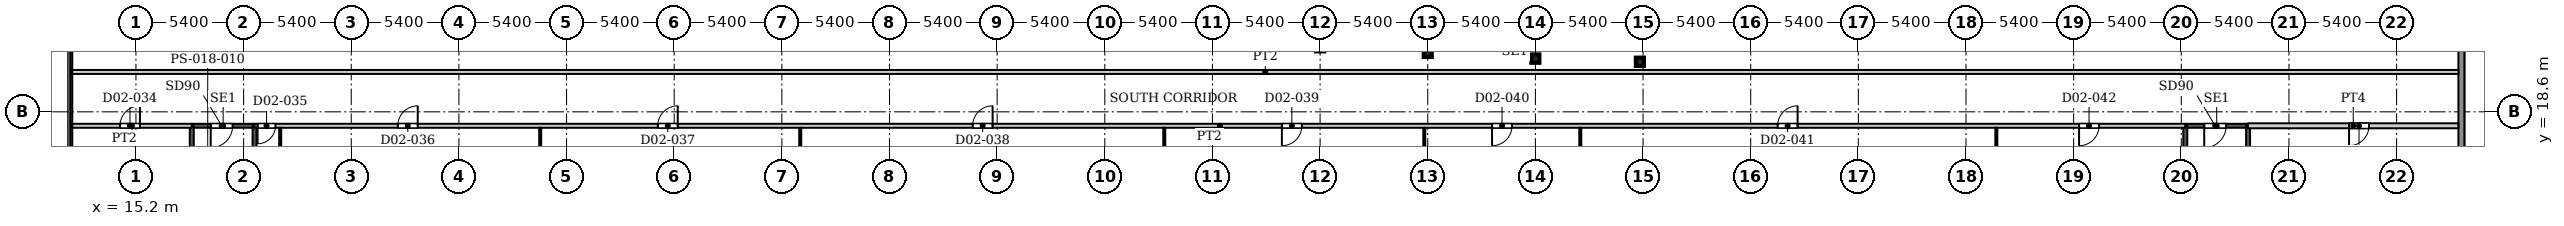
"""IFC4 building model, lengths in metres.
Left out: names, types, materials, properties, quantities, classifications, styles, units other than length and angle.
Written with IfcOpenShell. Run it as: python <this file> out.ifc"""

import sys

from ifc_helpers import new_model, si_unit, direction, frame, frame_2d, origin, origin_2d, place, context, subcontext, project, spatial, rectangle, i_section, extrude, source, transform, mapped, element, fill, save


model = new_model("IFC4")
c1 = context("Model", 3, precision=1e-05, world=origin(), true_north=direction((0.0, 1.0)))
c2 = subcontext(c1, "Body", "Model", "MODEL_VIEW")
j1 = project(units=[si_unit("LENGTHUNIT", "METRE"), si_unit("PLANEANGLEUNIT", "RADIAN")], contexts=[c1])
p1 = place(None, origin())
s1 = spatial("IfcSite", under=j1, at=p1, CompositionType="ELEMENT")
p2 = place(p1, origin())
s2 = spatial("IfcBuilding", under=s1, at=p2, CompositionType="ELEMENT")
p3 = place(p2, frame((0.0, 0.0, 12.5)))
s3 = spatial("IfcBuildingStorey", under=s2, at=p3, CompositionType="ELEMENT", Elevation=12.5)
for number, where, z_axis, x_axis in (
    (1, (90.64, 21.11, 0.0), (0.0, 0.0, 1.0), (1.0, 0.0, 0.0)),
    (2, (85.4, 21.27, 0.0), (0.0, 0.0, 1.0), (1.0, 0.0, 0.0)),
    (3, (80.0, 21.56, 0.0), (0.0, 0.0, 1.0), (1.0, 0.0, 0.0)),
):
    element("IfcColumn", number, at=place(p3, frame(where, z_axis=z_axis, x_axis=x_axis)), inside=s3, PredefinedType="COLUMN", context=c2, shape_type="SweptSolid", body=[
        extrude(i_section(OverallWidth=0.409, OverallDepth=0.425, WebThickness=0.033, FlangeThickness=0.052, FilletRadius=0.013, at=origin_2d()), origin(), (0.0, 0.0, 1.0), 4.5),
    ])
p4 = place(p3, frame((131.85, 54.72, 0.0), z_axis=(0.0, 0.0, 1.0), x_axis=(0.0, -1.0, 0.0)))
e4 = element("IfcWall", 4, at=p4, inside=s3, PredefinedType="SOLIDWALL", context=c2, shape_type="SweptSolid", body=[
    extrude(rectangle(XDim=38.72, YDim=0.3, at=frame_2d((19.36, 0.0))), origin(), (0.0, 0.0, 1.0), 4.25),
])
p5 = place(p4, frame((2.435, 0.0, 0.9)))
e5 = element("IfcOpeningElement", 5, at=p5, cuts=e4, PredefinedType="OPENING", context=c2, shape_type="SweptSolid", body=[
    extrude(rectangle(XDim=2.7, YDim=2.1, at=frame_2d((1.35, 1.05))), frame((0.0, 0.16, 0.0), z_axis=(0.0, -1.0, 0.0), x_axis=(1.0, 0.0, 0.0)), (0.0, 0.0, 1.0), 0.32),
])
p6 = place(p4, frame((13.58, 0.0, 0.9)))
e6 = element("IfcOpeningElement", 6, at=p6, cuts=e4, PredefinedType="OPENING", context=c2, shape_type="SweptSolid", body=[
    extrude(rectangle(XDim=2.7, YDim=2.1, at=frame_2d((1.35, 1.05))), frame((0.0, 0.16, 0.0), z_axis=(0.0, -1.0, 0.0), x_axis=(1.0, 0.0, 0.0)), (0.0, 0.0, 1.0), 0.32),
])
p7 = place(p4, frame((26.16, 0.0, 0.9)))
e7 = element("IfcOpeningElement", 7, at=p7, cuts=e4, PredefinedType="OPENING", context=c2, shape_type="SweptSolid", body=[
    extrude(rectangle(XDim=2.7, YDim=2.1, at=frame_2d((1.35, 1.05))), frame((0.0, 0.16, 0.0), z_axis=(0.0, -1.0, 0.0), x_axis=(1.0, 0.0, 0.0)), (0.0, 0.0, 1.0), 0.32),
])
p8 = place(p3, frame((18.0, 17.9, 0.0), z_axis=(0.0, 0.0, 1.0), x_axis=(1.0, 0.0, 0.0)))
e8 = element("IfcWall", 8, at=p8, inside=s3, PredefinedType="SHEAR", context=c2, shape_type="SweptSolid", body=[
    extrude(rectangle(XDim=3.15, YDim=0.2, at=frame_2d((1.575, 0.0))), origin(), (0.0, 0.0, 1.0), 4.5),
])
p9 = place(p8, frame((0.95, 0.0, 0.0)))
e9 = element("IfcOpeningElement", 9, at=p9, cuts=e8, PredefinedType="OPENING", context=c2, shape_type="SweptSolid", body=[
    extrude(rectangle(XDim=1.1, YDim=2.2, at=frame_2d((0.55, 1.1))), frame((0.0, 0.11, 0.0), z_axis=(0.0, -1.0, 0.0), x_axis=(1.0, 0.0, 0.0)), (0.0, 0.0, 1.0), 0.22),
])
p10 = place(p3, frame((18.0, 11.2, 0.0), z_axis=(0.0, 0.0, 1.0), x_axis=(0.0, 1.0, 0.0)))
e10 = element("IfcWall", 10, at=p10, inside=s3, PredefinedType="SHEAR", context=c2, shape_type="SweptSolid", body=[
    extrude(rectangle(XDim=6.7, YDim=0.2, at=frame_2d((3.35, 0.0))), origin(), (0.0, 0.0, 1.0), 4.5),
])
p11 = place(p3, frame((21.15, 10.0, 0.0), z_axis=(0.0, 0.0, 1.0), x_axis=(0.0, 1.0, 0.0)))
e11 = element("IfcWall", 11, at=p11, inside=s3, PredefinedType="SHEAR", context=c2, shape_type="SweptSolid", body=[
    extrude(rectangle(XDim=7.9, YDim=0.2, at=frame_2d((3.95, 0.0))), origin(), (0.0, 0.0, 1.0), 4.5),
])
p12 = place(p3, frame((118.0, 17.9, 0.0), z_axis=(0.0, 0.0, 1.0), x_axis=(1.0, 0.0, 0.0)))
e12 = element("IfcWall", 12, at=p12, inside=s3, PredefinedType="SHEAR", context=c2, shape_type="SweptSolid", body=[
    extrude(rectangle(XDim=3.15, YDim=0.2, at=frame_2d((1.575, 0.0))), origin(), (0.0, 0.0, 1.0), 4.5),
])
p13 = place(p12, frame((0.95, 0.0, 0.0)))
e13 = element("IfcOpeningElement", 13, at=p13, cuts=e12, PredefinedType="OPENING", context=c2, shape_type="SweptSolid", body=[
    extrude(rectangle(XDim=1.1, YDim=2.2, at=frame_2d((0.55, 1.1))), frame((0.0, 0.11, 0.0), z_axis=(0.0, -1.0, 0.0), x_axis=(1.0, 0.0, 0.0)), (0.0, 0.0, 1.0), 0.22),
])
p14 = place(p3, frame((118.0, 11.2, 0.0), z_axis=(0.0, 0.0, 1.0), x_axis=(0.0, 1.0, 0.0)))
e14 = element("IfcWall", 14, at=p14, inside=s3, PredefinedType="SHEAR", context=c2, shape_type="SweptSolid", body=[
    extrude(rectangle(XDim=6.7, YDim=0.2, at=frame_2d((3.35, 0.0))), origin(), (0.0, 0.0, 1.0), 4.5),
])
p15 = place(p3, frame((121.15, 10.0, 0.0), z_axis=(0.0, 0.0, 1.0), x_axis=(0.0, 1.0, 0.0)))
e15 = element("IfcWall", 15, at=p15, inside=s3, PredefinedType="SHEAR", context=c2, shape_type="SweptSolid", body=[
    extrude(rectangle(XDim=7.9, YDim=0.2, at=frame_2d((3.95, 0.0))), origin(), (0.0, 0.0, 1.0), 4.5),
])
p16 = place(p3, frame((12.0, 17.9, 0.0), z_axis=(0.0, 0.0, 1.0), x_axis=(1.0, 0.0, 0.0)))
e16 = element("IfcWall", 16, at=p16, inside=s3, PredefinedType="PARTITIONING", context=c2, shape_type="SweptSolid", body=[
    extrude(rectangle(XDim=6.0, YDim=0.2, at=frame_2d((3.0, 0.0))), origin(), (0.0, 0.0, 1.0), 4.18),
])
p17 = place(p16, frame((2.4, 0.0, 0.0)))
e17 = element("IfcOpeningElement", 17, at=p17, cuts=e16, PredefinedType="OPENING", context=c2, shape_type="SweptSolid", body=[
    extrude(rectangle(XDim=1.0, YDim=2.1, at=frame_2d((0.5, 1.05))), frame((0.0, 0.11, 0.0), z_axis=(0.0, -1.0, 0.0), x_axis=(1.0, 0.0, 0.0)), (0.0, 0.0, 1.0), 0.22),
])
p18 = place(p3, frame((12.0, 20.6, 0.0), z_axis=(0.0, 0.0, 1.0), x_axis=(1.0, 0.0, 0.0)))
e18 = element("IfcWall", 18, at=p18, inside=s3, PredefinedType="PARTITIONING", context=c2, shape_type="SweptSolid", body=[
    extrude(rectangle(XDim=119.701, YDim=0.2, at=frame_2d((59.851, 0.0))), origin(), (0.0, 0.0, 1.0), 4.18),
])
p19 = place(p3, frame((21.15, 17.9, 0.0), z_axis=(0.0, 0.0, 1.0), x_axis=(1.0, 0.0, 0.0)))
e19 = element("IfcWall", 19, at=p19, inside=s3, PredefinedType="PARTITIONING", context=c2, shape_type="SweptSolid", body=[
    extrude(rectangle(XDim=96.85, YDim=0.2, at=frame_2d((48.425, 0.0))), origin(), (0.0, 0.0, 1.0), 4.18),
])
p20 = place(p19, frame((0.15, 0.0, 0.0)))
e20 = element("IfcOpeningElement", 20, at=p20, cuts=e19, PredefinedType="OPENING", context=c2, shape_type="SweptSolid", body=[
    extrude(rectangle(XDim=0.9, YDim=2.1, at=frame_2d((0.45, 1.05))), frame((0.0, 0.11, 0.0), z_axis=(0.0, -1.0, 0.0), x_axis=(1.0, 0.0, 0.0)), (0.0, 0.0, 1.0), 0.22),
])
p21 = place(p19, frame((7.185, 0.0, 0.0)))
e21 = element("IfcOpeningElement", 21, at=p21, cuts=e19, PredefinedType="OPENING", context=c2, shape_type="SweptSolid", body=[
    extrude(rectangle(XDim=1.0, YDim=2.1, at=frame_2d((0.5, 1.05))), frame((0.0, 0.11, 0.0), z_axis=(0.0, -1.0, 0.0), x_axis=(1.0, 0.0, 0.0)), (0.0, 0.0, 1.0), 0.22),
])
p22 = place(p19, frame((20.228, 0.0, 0.0)))
e22 = element("IfcOpeningElement", 22, at=p22, cuts=e19, PredefinedType="OPENING", context=c2, shape_type="SweptSolid", body=[
    extrude(rectangle(XDim=1.0, YDim=2.1, at=frame_2d((0.5, 1.05))), frame((0.0, 0.11, 0.0), z_axis=(0.0, -1.0, 0.0), x_axis=(1.0, 0.0, 0.0)), (0.0, 0.0, 1.0), 0.22),
])
p23 = place(p19, frame((36.022, 0.0, 0.0)))
e23 = element("IfcOpeningElement", 23, at=p23, cuts=e19, PredefinedType="OPENING", context=c2, shape_type="SweptSolid", body=[
    extrude(rectangle(XDim=1.0, YDim=2.1, at=frame_2d((0.5, 1.05))), frame((0.0, 0.11, 0.0), z_axis=(0.0, -1.0, 0.0), x_axis=(1.0, 0.0, 0.0)), (0.0, 0.0, 1.0), 0.22),
])
p24 = place(p19, frame((51.533, 0.0, 0.0)))
e24 = element("IfcOpeningElement", 24, at=p24, cuts=e19, PredefinedType="OPENING", context=c2, shape_type="SweptSolid", body=[
    extrude(rectangle(XDim=1.0, YDim=2.1, at=frame_2d((0.5, 1.05))), frame((0.0, 0.11, 0.0), z_axis=(0.0, -1.0, 0.0), x_axis=(1.0, 0.0, 0.0)), (0.0, 0.0, 1.0), 0.22),
])
p25 = place(p19, frame((62.076, 0.0, 0.0)))
e25 = element("IfcOpeningElement", 25, at=p25, cuts=e19, PredefinedType="OPENING", context=c2, shape_type="SweptSolid", body=[
    extrude(rectangle(XDim=1.0, YDim=2.1, at=frame_2d((0.5, 1.05))), frame((0.0, 0.11, 0.0), z_axis=(0.0, -1.0, 0.0), x_axis=(1.0, 0.0, 0.0)), (0.0, 0.0, 1.0), 0.22),
])
p26 = place(p19, frame((76.402, 0.0, 0.0)))
e26 = element("IfcOpeningElement", 26, at=p26, cuts=e19, PredefinedType="OPENING", context=c2, shape_type="SweptSolid", body=[
    extrude(rectangle(XDim=1.0, YDim=2.1, at=frame_2d((0.5, 1.05))), frame((0.0, 0.11, 0.0), z_axis=(0.0, -1.0, 0.0), x_axis=(1.0, 0.0, 0.0)), (0.0, 0.0, 1.0), 0.22),
])
p27 = place(p19, frame((91.522, 0.0, 0.0)))
e27 = element("IfcOpeningElement", 27, at=p27, cuts=e19, PredefinedType="OPENING", context=c2, shape_type="SweptSolid", body=[
    extrude(rectangle(XDim=1.0, YDim=2.1, at=frame_2d((0.5, 1.05))), frame((0.0, 0.11, 0.0), z_axis=(0.0, -1.0, 0.0), x_axis=(1.0, 0.0, 0.0)), (0.0, 0.0, 1.0), 0.22),
])
for number, where, z_axis, x_axis in (
    (28, (22.435, 10.299, 0.0), (0.0, 0.0, 1.0), (0.0, 1.0, 0.0)),
    (29, (35.478, 10.299, 0.0), (0.0, 0.0, 1.0), (0.0, 1.0, 0.0)),
    (30, (48.522, 10.299, 0.0), (0.0, 0.0, 1.0), (0.0, 1.0, 0.0)),
):
    element("IfcWall", number, at=place(p3, frame(where, z_axis=z_axis, x_axis=x_axis)), inside=s3, PredefinedType="PARTITIONING", context=c2, shape_type="SweptSolid", body=[
        extrude(rectangle(XDim=7.501, YDim=0.1, at=frame_2d((3.75, 0.0))), origin(), (0.0, 0.0, 1.0), 4.18),
    ])
p28 = place(p3, frame((66.783, 10.0, 0.0), z_axis=(0.0, 0.0, 1.0), x_axis=(0.0, 1.0, 0.0)))
e31 = element("IfcWall", 31, at=p28, inside=s3, PredefinedType="PARTITIONING", context=c2, shape_type="SweptSolid", body=[
    extrude(rectangle(XDim=7.8, YDim=0.1, at=frame_2d((3.9, 0.0))), origin(), (0.0, 0.0, 1.0), 4.18),
])
p29 = place(p3, frame((79.826, 10.0, 0.0), z_axis=(0.0, 0.0, 1.0), x_axis=(0.0, 1.0, 0.0)))
e32 = element("IfcWall", 32, at=p29, inside=s3, PredefinedType="PARTITIONING", context=c2, shape_type="SweptSolid", body=[
    extrude(rectangle(XDim=7.8, YDim=0.1, at=frame_2d((3.9, 0.0))), origin(), (0.0, 0.0, 1.0), 3.763),
])
for number, where, z_axis, x_axis in (
    (33, (87.652, 10.0, 0.0), (0.0, 0.0, 1.0), (0.0, 1.0, 0.0)),
    (34, (108.522, 10.0, 0.0), (0.0, 0.0, 1.0), (0.0, 1.0, 0.0)),
):
    element("IfcWall", number, at=place(p3, frame(where, z_axis=z_axis, x_axis=x_axis)), inside=s3, PredefinedType="PARTITIONING", context=c2, shape_type="SweptSolid", body=[
        extrude(rectangle(XDim=7.8, YDim=0.1, at=frame_2d((3.9, 0.0))), origin(), (0.0, 0.0, 1.0), 4.18),
    ])
p30 = place(p3, frame((121.15, 17.9, 0.0), z_axis=(0.0, 0.0, 1.0), x_axis=(1.0, 0.0, 0.0)))
e35 = element("IfcWall", 35, at=p30, inside=s3, PredefinedType="PARTITIONING", context=c2, shape_type="SweptSolid", body=[
    extrude(rectangle(XDim=10.551, YDim=0.25, at=frame_2d((5.275, 0.0))), origin(), (0.0, 0.0, 1.0), 4.18),
])
p31 = place(p30, frame((5.065, 0.0, 0.0)))
e36 = element("IfcOpeningElement", 36, at=p31, cuts=e35, PredefinedType="OPENING", context=c2, shape_type="SweptSolid", body=[
    extrude(rectangle(XDim=1.0, YDim=2.1, at=frame_2d((0.5, 1.05))), frame((0.0, 0.135, 0.0), z_axis=(0.0, -1.0, 0.0), x_axis=(1.0, 0.0, 0.0)), (0.0, 0.0, 1.0), 0.27),
])
m1 = source(origin(), c2, "Body", "SweptSolid", [
    extrude(rectangle(XDim=1.1, YDim=2.2, at=frame_2d((0.55, 1.1))), frame((0.0, 0.025, 0.0), z_axis=(0.0, -1.0, 0.0), x_axis=(1.0, 0.0, 0.0)), (0.0, 0.0, 1.0), 0.05),
])
p32 = place(p9, origin())
e37 = element("IfcDoor", 37, at=p32, inside=s3, OperationType="SINGLE_SWING_RIGHT", PredefinedType="DOOR", context=c2, shape_type="MappedRepresentation", body=[
    mapped(m1, transform((0.0, 0.0, 0.0), x_axis=(1.0, 0.0, 0.0), y_axis=(0.0, 1.0, 0.0), z_axis=(0.0, 0.0, 1.0), scale=1.0)),
])
fill(e9, e37)
p33 = place(p13, origin())
e38 = element("IfcDoor", 38, at=p33, inside=s3, OperationType="SINGLE_SWING_RIGHT", PredefinedType="DOOR", context=c2, shape_type="MappedRepresentation", body=[
    mapped(m1, transform((0.0, 0.0, 0.0), x_axis=(1.0, 0.0, 0.0), y_axis=(0.0, 1.0, 0.0), z_axis=(0.0, 0.0, 1.0), scale=1.0)),
])
fill(e13, e38)
m2 = source(origin(), c2, "Body", "SweptSolid", [
    extrude(rectangle(XDim=1.0, YDim=2.1, at=frame_2d((0.5, 1.05))), frame((0.0, 0.025, 0.0), z_axis=(0.0, -1.0, 0.0), x_axis=(1.0, 0.0, 0.0)), (0.0, 0.0, 1.0), 0.05),
])
p34 = place(p17, origin())
e39 = element("IfcDoor", 39, at=p34, inside=s3, OperationType="SINGLE_SWING_LEFT", PredefinedType="DOOR", context=c2, shape_type="MappedRepresentation", body=[
    mapped(m2, transform((0.0, 0.0, 0.0), x_axis=(1.0, 0.0, 0.0), y_axis=(0.0, 1.0, 0.0), z_axis=(0.0, 0.0, 1.0), scale=1.0)),
])
fill(e17, e39)
m3 = source(origin(), c2, "Body", "SweptSolid", [
    extrude(rectangle(XDim=0.9, YDim=2.1, at=frame_2d((0.45, 1.05))), frame((0.0, 0.025, 0.0), z_axis=(0.0, -1.0, 0.0), x_axis=(1.0, 0.0, 0.0)), (0.0, 0.0, 1.0), 0.05),
])
p35 = place(p20, origin())
e40 = element("IfcDoor", 40, at=p35, inside=s3, OperationType="SINGLE_SWING_RIGHT", PredefinedType="DOOR", context=c2, shape_type="MappedRepresentation", body=[
    mapped(m3, transform((0.0, 0.0, 0.0), x_axis=(1.0, 0.0, 0.0), y_axis=(0.0, 1.0, 0.0), z_axis=(0.0, 0.0, 1.0), scale=1.0)),
])
fill(e20, e40)
p36 = place(p21, origin())
e41 = element("IfcDoor", 41, at=p36, inside=s3, OperationType="SINGLE_SWING_LEFT", PredefinedType="DOOR", context=c2, shape_type="MappedRepresentation", body=[
    mapped(m2, transform((0.0, 0.0, 0.0), x_axis=(1.0, 0.0, 0.0), y_axis=(0.0, 1.0, 0.0), z_axis=(0.0, 0.0, 1.0), scale=1.0)),
])
fill(e21, e41)
p37 = place(p22, origin())
e42 = element("IfcDoor", 42, at=p37, inside=s3, OperationType="SINGLE_SWING_LEFT", PredefinedType="DOOR", context=c2, shape_type="MappedRepresentation", body=[
    mapped(m2, transform((0.0, 0.0, 0.0), x_axis=(1.0, 0.0, 0.0), y_axis=(0.0, 1.0, 0.0), z_axis=(0.0, 0.0, 1.0), scale=1.0)),
])
fill(e22, e42)
p38 = place(p23, origin())
e43 = element("IfcDoor", 43, at=p38, inside=s3, OperationType="SINGLE_SWING_LEFT", PredefinedType="DOOR", context=c2, shape_type="MappedRepresentation", body=[
    mapped(m2, transform((0.0, 0.0, 0.0), x_axis=(1.0, 0.0, 0.0), y_axis=(0.0, 1.0, 0.0), z_axis=(0.0, 0.0, 1.0), scale=1.0)),
])
fill(e23, e43)
p39 = place(p24, origin())
e44 = element("IfcDoor", 44, at=p39, inside=s3, OperationType="SINGLE_SWING_RIGHT", PredefinedType="DOOR", context=c2, shape_type="MappedRepresentation", body=[
    mapped(m2, transform((0.0, 0.0, 0.0), x_axis=(1.0, 0.0, 0.0), y_axis=(0.0, 1.0, 0.0), z_axis=(0.0, 0.0, 1.0), scale=1.0)),
])
fill(e24, e44)
p40 = place(p25, origin())
e45 = element("IfcDoor", 45, at=p40, inside=s3, OperationType="SINGLE_SWING_RIGHT", PredefinedType="DOOR", context=c2, shape_type="MappedRepresentation", body=[
    mapped(m2, transform((0.0, 0.0, 0.0), x_axis=(1.0, 0.0, 0.0), y_axis=(0.0, 1.0, 0.0), z_axis=(0.0, 0.0, 1.0), scale=1.0)),
])
fill(e25, e45)
p41 = place(p26, origin())
e46 = element("IfcDoor", 46, at=p41, inside=s3, OperationType="SINGLE_SWING_LEFT", PredefinedType="DOOR", context=c2, shape_type="MappedRepresentation", body=[
    mapped(m2, transform((0.0, 0.0, 0.0), x_axis=(1.0, 0.0, 0.0), y_axis=(0.0, 1.0, 0.0), z_axis=(0.0, 0.0, 1.0), scale=1.0)),
])
fill(e26, e46)
p42 = place(p27, origin())
e47 = element("IfcDoor", 47, at=p42, inside=s3, OperationType="SINGLE_SWING_RIGHT", PredefinedType="DOOR", context=c2, shape_type="MappedRepresentation", body=[
    mapped(m2, transform((0.0, 0.0, 0.0), x_axis=(1.0, 0.0, 0.0), y_axis=(0.0, 1.0, 0.0), z_axis=(0.0, 0.0, 1.0), scale=1.0)),
])
fill(e27, e47)
m4 = source(origin(), c2, "Body", "SweptSolid", [
    extrude(rectangle(XDim=1.0, YDim=2.1, at=frame_2d((0.5, 1.05))), frame((0.0, 0.025, 0.0), z_axis=(0.0, -1.0, 0.0), x_axis=(1.0, 0.0, 0.0)), (0.0, 0.0, 1.0), 0.05),
])
p43 = place(p31, origin())
e48 = element("IfcDoor", 48, at=p43, inside=s3, OperationType="SINGLE_SWING_RIGHT", PredefinedType="DOOR", context=c2, shape_type="MappedRepresentation", body=[
    mapped(m4, transform((0.0, 0.0, 0.0), x_axis=(1.0, 0.0, 0.0), y_axis=(0.0, 1.0, 0.0), z_axis=(0.0, 0.0, 1.0), scale=1.0)),
])
fill(e36, e48)
save(model, sys.argv[1])
